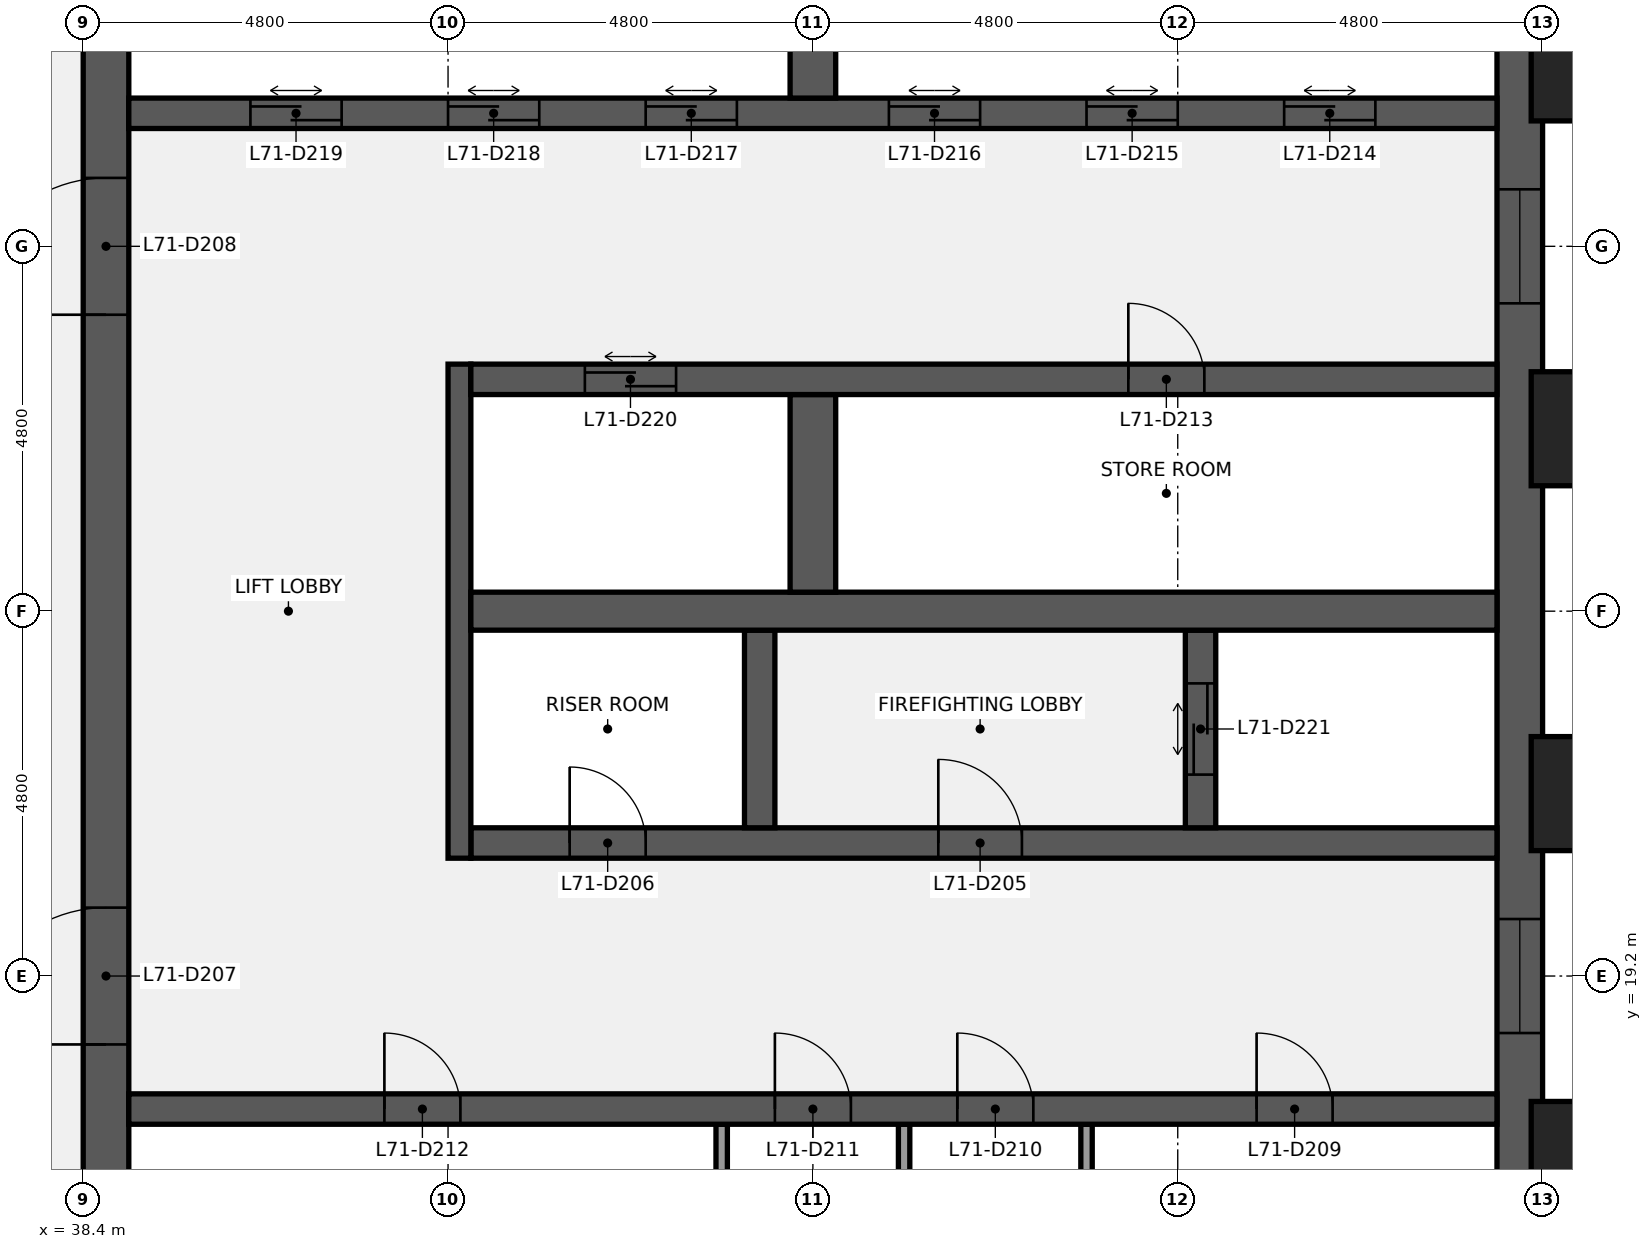
"""IFC4 building model, lengths in metres.
Left out: names, types, materials, properties, quantities, classifications, styles, units other than length and angle.
Written with IfcOpenShell. Run it as: python <this file> out.ifc"""

import sys

from ifc_helpers import new_model, si_unit, direction, frame, frame_2d, origin, origin_2d, place, context, subcontext, project, spatial, rectangle, extrude, element, fill, save


model = new_model("IFC4")
c1 = context("Model", 3, precision=1e-05, world=origin(), true_north=direction((0.0, 1.0)))
c2 = subcontext(c1, "Body", "Model", "MODEL_VIEW")
j1 = project(units=[si_unit("LENGTHUNIT", "METRE"), si_unit("PLANEANGLEUNIT", "RADIAN")], contexts=[c1])
p1 = place(None, origin())
s1 = spatial("IfcSite", under=j1, at=p1, CompositionType="ELEMENT")
p2 = place(p1, origin())
s2 = spatial("IfcBuilding", under=s1, at=p2, CompositionType="ELEMENT")
p3 = place(p2, frame((0.0, 0.0, 322.3)))
s3 = spatial("IfcBuildingStorey", under=s2, at=p3, CompositionType="ELEMENT", Elevation=322.3)
p4 = place(p3, frame((57.3, 38.4, 0.0), z_axis=(0.0, 0.0, 1.0), x_axis=(0.0, -1.0, 0.0)))
e1 = element("IfcWall", 1, at=p4, inside=s3, PredefinedType="SHEAR", context=c2, shape_type="SweptSolid", body=[
    extrude(rectangle(XDim=28.8, YDim=0.6, at=frame_2d((14.4, 0.0))), origin(), (0.0, 0.0, 1.0), 3.84),
])
p5 = place(p4, frame((18.45, 0.0, 0.9)))
e2 = element("IfcOpeningElement", 2, at=p5, cuts=e1, PredefinedType="OPENING", context=c2, shape_type="SweptSolid", body=[
    extrude(rectangle(XDim=1.5, YDim=1.5, at=frame_2d((0.75, 0.75))), frame((0.0, 0.31, 0.0), z_axis=(0.0, -1.0, 0.0), x_axis=(1.0, 0.0, 0.0)), (0.0, 0.0, 1.0), 0.62),
])
p6 = place(p4, frame((8.85, 0.0, 0.9)))
e3 = element("IfcOpeningElement", 3, at=p6, cuts=e1, PredefinedType="OPENING", context=c2, shape_type="SweptSolid", body=[
    extrude(rectangle(XDim=1.5, YDim=1.5, at=frame_2d((0.75, 0.75))), frame((0.0, 0.31, 0.0), z_axis=(0.0, -1.0, 0.0), x_axis=(1.0, 0.0, 0.0)), (0.0, 0.0, 1.0), 0.62),
])
p7 = place(p3, frame((38.7, 9.6, 0.0), z_axis=(0.0, 0.0, 1.0), x_axis=(0.0, 1.0, 0.0)))
e4 = element("IfcWall", 4, at=p7, inside=s3, PredefinedType="SHEAR", context=c2, shape_type="SweptSolid", body=[
    extrude(rectangle(XDim=28.8, YDim=0.6, at=frame_2d((14.4, 0.0))), origin(), (0.0, 0.0, 1.0), 3.84),
])
p8 = place(p7, frame((8.7, 0.0, 0.0)))
e5 = element("IfcOpeningElement", 5, at=p8, cuts=e4, PredefinedType="OPENING", context=c2, shape_type="SweptSolid", body=[
    extrude(rectangle(XDim=1.8, YDim=2.1, at=frame_2d((0.9, 1.05))), frame((0.0, 0.31, 0.0), z_axis=(0.0, -1.0, 0.0), x_axis=(1.0, 0.0, 0.0)), (0.0, 0.0, 1.0), 0.62),
])
p9 = place(p7, frame((18.3, 0.0, 0.0)))
e6 = element("IfcOpeningElement", 6, at=p9, cuts=e4, PredefinedType="OPENING", context=c2, shape_type="SweptSolid", body=[
    extrude(rectangle(XDim=1.8, YDim=2.1, at=frame_2d((0.9, 1.05))), frame((0.0, 0.31, 0.0), z_axis=(0.0, -1.0, 0.0), x_axis=(1.0, 0.0, 0.0)), (0.0, 0.0, 1.0), 0.62),
])
for number, where, z_axis, x_axis in (
    (7, (51.6, 14.65, 0.0), (0.0, 0.0, 1.0), (0.0, 1.0, 0.0)),
    (8, (49.2, 14.65, 0.0), (0.0, 0.0, 1.0), (0.0, 1.0, 0.0)),
    (9, (46.8, 14.65, 0.0), (0.0, 0.0, 1.0), (0.0, 1.0, 0.0)),
):
    element("IfcWall", number, at=place(p3, frame(where, z_axis=z_axis, x_axis=x_axis)), inside=s3, PredefinedType="PARTITIONING", context=c2, shape_type="SweptSolid", body=[
        extrude(rectangle(XDim=2.6, YDim=0.15, at=frame_2d((1.3, 0.0))), origin(), (0.0, 0.0, 1.0), 3.84),
    ])
p10 = place(p3, frame((39.0, 17.45, 0.0), z_axis=(0.0, 0.0, 1.0), x_axis=(1.0, 0.0, 0.0)))
e10 = element("IfcWall", 10, at=p10, inside=s3, PredefinedType="SHEAR", context=c2, shape_type="SweptSolid", body=[
    extrude(rectangle(XDim=18.0, YDim=0.4, at=frame_2d((9.0, 0.0))), origin(), (0.0, 0.0, 1.0), 3.84),
])
p11 = place(p10, frame((14.837, 0.0, 0.0)))
e11 = element("IfcOpeningElement", 11, at=p11, cuts=e10, PredefinedType="OPENING", context=c2, shape_type="SweptSolid", body=[
    extrude(rectangle(XDim=1.0, YDim=2.1, at=frame_2d((0.5, 1.05))), frame((0.0, 0.21, 0.0), z_axis=(0.0, -1.0, 0.0), x_axis=(1.0, 0.0, 0.0)), (0.0, 0.0, 1.0), 0.42),
])
p12 = place(p10, frame((10.9, 0.0, 0.0)))
e12 = element("IfcOpeningElement", 12, at=p12, cuts=e10, PredefinedType="OPENING", context=c2, shape_type="SweptSolid", body=[
    extrude(rectangle(XDim=1.0, YDim=2.1, at=frame_2d((0.5, 1.05))), frame((0.0, 0.21, 0.0), z_axis=(0.0, -1.0, 0.0), x_axis=(1.0, 0.0, 0.0)), (0.0, 0.0, 1.0), 0.42),
])
p13 = place(p10, frame((8.5, 0.0, 0.0)))
e13 = element("IfcOpeningElement", 13, at=p13, cuts=e10, PredefinedType="OPENING", context=c2, shape_type="SweptSolid", body=[
    extrude(rectangle(XDim=1.0, YDim=2.1, at=frame_2d((0.5, 1.05))), frame((0.0, 0.21, 0.0), z_axis=(0.0, -1.0, 0.0), x_axis=(1.0, 0.0, 0.0)), (0.0, 0.0, 1.0), 0.42),
])
p14 = place(p10, frame((3.363, 0.0, 0.0)))
e14 = element("IfcOpeningElement", 14, at=p14, cuts=e10, PredefinedType="OPENING", context=c2, shape_type="SweptSolid", body=[
    extrude(rectangle(XDim=1.0, YDim=2.1, at=frame_2d((0.5, 1.05))), frame((0.0, 0.21, 0.0), z_axis=(0.0, -1.0, 0.0), x_axis=(1.0, 0.0, 0.0)), (0.0, 0.0, 1.0), 0.42),
])
p15 = place(p3, frame((43.5, 20.95, 0.0), z_axis=(0.0, 0.0, 1.0), x_axis=(1.0, 0.0, 0.0)))
e15 = element("IfcWall", 15, at=p15, inside=s3, PredefinedType="SHEAR", context=c2, shape_type="SweptSolid", body=[
    extrude(rectangle(XDim=13.5, YDim=0.4, at=frame_2d((6.75, 0.0))), origin(), (0.0, 0.0, 1.0), 3.84),
])
p16 = place(p15, frame((6.15, 0.0, 0.0)))
e16 = element("IfcOpeningElement", 16, at=p16, cuts=e15, PredefinedType="OPENING", context=c2, shape_type="SweptSolid", body=[
    extrude(rectangle(XDim=1.1, YDim=2.1, at=frame_2d((0.55, 1.05))), frame((0.0, 0.21, 0.0), z_axis=(0.0, -1.0, 0.0), x_axis=(1.0, 0.0, 0.0)), (0.0, 0.0, 1.0), 0.42),
])
p17 = place(p15, frame((1.3, 0.0, 0.0)))
e17 = element("IfcOpeningElement", 17, at=p17, cuts=e15, PredefinedType="OPENING", context=c2, shape_type="SweptSolid", body=[
    extrude(rectangle(XDim=1.0, YDim=2.1, at=frame_2d((0.5, 1.05))), frame((0.0, 0.21, 0.0), z_axis=(0.0, -1.0, 0.0), x_axis=(1.0, 0.0, 0.0)), (0.0, 0.0, 1.0), 0.42),
])
p18 = place(p3, frame((43.35, 20.75, 0.0), z_axis=(0.0, 0.0, 1.0), x_axis=(0.0, 1.0, 0.0)))
e18 = element("IfcWall", 18, at=p18, inside=s3, PredefinedType="SHEAR", context=c2, shape_type="SweptSolid", body=[
    extrude(rectangle(XDim=6.5, YDim=0.3, at=frame_2d((3.25, 0.0))), origin(), (0.0, 0.0, 1.0), 3.84),
])
p19 = place(p3, frame((53.1, 21.15, 0.0), z_axis=(0.0, 0.0, 1.0), x_axis=(0.0, 1.0, 0.0)))
e19 = element("IfcWall", 19, at=p19, inside=s3, PredefinedType="SHEAR", context=c2, shape_type="SweptSolid", body=[
    extrude(rectangle(XDim=2.6, YDim=0.4, at=frame_2d((1.3, 0.0))), origin(), (0.0, 0.0, 1.0), 3.84),
])
p20 = place(p19, frame((0.7, 0.0, 0.0)))
e20 = element("IfcOpeningElement", 20, at=p20, cuts=e19, PredefinedType="OPENING", context=c2, shape_type="SweptSolid", body=[
    extrude(rectangle(XDim=1.2, YDim=2.1, at=frame_2d((0.6, 1.05))), frame((0.0, 0.21, 0.0), z_axis=(0.0, -1.0, 0.0), x_axis=(1.0, 0.0, 0.0)), (0.0, 0.0, 1.0), 0.42),
])
p21 = place(p3, frame((47.3, 21.15, 0.0), z_axis=(0.0, 0.0, 1.0), x_axis=(0.0, 1.0, 0.0)))
e21 = element("IfcWall", 21, at=p21, inside=s3, PredefinedType="SHEAR", context=c2, shape_type="SweptSolid", body=[
    extrude(rectangle(XDim=2.6, YDim=0.4, at=frame_2d((1.3, 0.0))), origin(), (0.0, 0.0, 1.0), 3.84),
])
p22 = place(p3, frame((43.5, 24.0, 0.0), z_axis=(0.0, 0.0, 1.0), x_axis=(1.0, 0.0, 0.0)))
e22 = element("IfcWall", 22, at=p22, inside=s3, PredefinedType="SHEAR", context=c2, shape_type="SweptSolid", body=[
    extrude(rectangle(XDim=13.5, YDim=0.5, at=frame_2d((6.75, 0.0))), origin(), (0.0, 0.0, 1.0), 3.84),
])
p23 = place(p3, frame((48.0, 24.25, 0.0), z_axis=(0.0, 0.0, 1.0), x_axis=(0.0, 1.0, 0.0)))
e23 = element("IfcWall", 23, at=p23, inside=s3, PredefinedType="SHEAR", context=c2, shape_type="SweptSolid", body=[
    extrude(rectangle(XDim=2.6, YDim=0.6, at=frame_2d((1.3, 0.0))), origin(), (0.0, 0.0, 1.0), 3.84),
])
p24 = place(p3, frame((43.5, 27.05, 0.0), z_axis=(0.0, 0.0, 1.0), x_axis=(1.0, 0.0, 0.0)))
e24 = element("IfcWall", 24, at=p24, inside=s3, PredefinedType="SHEAR", context=c2, shape_type="SweptSolid", body=[
    extrude(rectangle(XDim=13.5, YDim=0.4, at=frame_2d((6.75, 0.0))), origin(), (0.0, 0.0, 1.0), 3.84),
])
p25 = place(p24, frame((8.65, 0.0, 0.0)))
e25 = element("IfcOpeningElement", 25, at=p25, cuts=e24, PredefinedType="OPENING", context=c2, shape_type="SweptSolid", body=[
    extrude(rectangle(XDim=1.0, YDim=2.1, at=frame_2d((0.5, 1.05))), frame((0.0, 0.21, 0.0), z_axis=(0.0, -1.0, 0.0), x_axis=(1.0, 0.0, 0.0)), (0.0, 0.0, 1.0), 0.42),
])
p26 = place(p24, frame((1.5, 0.0, 0.0)))
e26 = element("IfcOpeningElement", 26, at=p26, cuts=e24, PredefinedType="OPENING", context=c2, shape_type="SweptSolid", body=[
    extrude(rectangle(XDim=1.2, YDim=2.1, at=frame_2d((0.6, 1.05))), frame((0.0, 0.21, 0.0), z_axis=(0.0, -1.0, 0.0), x_axis=(1.0, 0.0, 0.0)), (0.0, 0.0, 1.0), 0.42),
])
p27 = place(p3, frame((39.0, 30.55, 0.0), z_axis=(0.0, 0.0, 1.0), x_axis=(1.0, 0.0, 0.0)))
e27 = element("IfcWall", 27, at=p27, inside=s3, PredefinedType="SHEAR", context=c2, shape_type="SweptSolid", body=[
    extrude(rectangle(XDim=18.0, YDim=0.4, at=frame_2d((9.0, 0.0))), origin(), (0.0, 0.0, 1.0), 3.84),
])
p28 = place(p27, frame((15.2, 0.0, 0.0)))
e28 = element("IfcOpeningElement", 28, at=p28, cuts=e27, PredefinedType="OPENING", context=c2, shape_type="SweptSolid", body=[
    extrude(rectangle(XDim=1.2, YDim=2.1, at=frame_2d((0.6, 1.05))), frame((0.0, 0.21, 0.0), z_axis=(0.0, -1.0, 0.0), x_axis=(1.0, 0.0, 0.0)), (0.0, 0.0, 1.0), 0.42),
])
p29 = place(p27, frame((12.6, 0.0, 0.0)))
e29 = element("IfcOpeningElement", 29, at=p29, cuts=e27, PredefinedType="OPENING", context=c2, shape_type="SweptSolid", body=[
    extrude(rectangle(XDim=1.2, YDim=2.1, at=frame_2d((0.6, 1.05))), frame((0.0, 0.21, 0.0), z_axis=(0.0, -1.0, 0.0), x_axis=(1.0, 0.0, 0.0)), (0.0, 0.0, 1.0), 0.42),
])
p30 = place(p27, frame((10.0, 0.0, 0.0)))
e30 = element("IfcOpeningElement", 30, at=p30, cuts=e27, PredefinedType="OPENING", context=c2, shape_type="SweptSolid", body=[
    extrude(rectangle(XDim=1.2, YDim=2.1, at=frame_2d((0.6, 1.05))), frame((0.0, 0.21, 0.0), z_axis=(0.0, -1.0, 0.0), x_axis=(1.0, 0.0, 0.0)), (0.0, 0.0, 1.0), 0.42),
])
p31 = place(p27, frame((6.8, 0.0, 0.0)))
e31 = element("IfcOpeningElement", 31, at=p31, cuts=e27, PredefinedType="OPENING", context=c2, shape_type="SweptSolid", body=[
    extrude(rectangle(XDim=1.2, YDim=2.1, at=frame_2d((0.6, 1.05))), frame((0.0, 0.21, 0.0), z_axis=(0.0, -1.0, 0.0), x_axis=(1.0, 0.0, 0.0)), (0.0, 0.0, 1.0), 0.42),
])
p32 = place(p27, frame((4.2, 0.0, 0.0)))
e32 = element("IfcOpeningElement", 32, at=p32, cuts=e27, PredefinedType="OPENING", context=c2, shape_type="SweptSolid", body=[
    extrude(rectangle(XDim=1.2, YDim=2.1, at=frame_2d((0.6, 1.05))), frame((0.0, 0.21, 0.0), z_axis=(0.0, -1.0, 0.0), x_axis=(1.0, 0.0, 0.0)), (0.0, 0.0, 1.0), 0.42),
])
p33 = place(p27, frame((1.6, 0.0, 0.0)))
e33 = element("IfcOpeningElement", 33, at=p33, cuts=e27, PredefinedType="OPENING", context=c2, shape_type="SweptSolid", body=[
    extrude(rectangle(XDim=1.2, YDim=2.1, at=frame_2d((0.6, 1.05))), frame((0.0, 0.21, 0.0), z_axis=(0.0, -1.0, 0.0), x_axis=(1.0, 0.0, 0.0)), (0.0, 0.0, 1.0), 0.42),
])
p34 = place(p3, frame((48.0, 30.75, 0.0), z_axis=(0.0, 0.0, 1.0), x_axis=(0.0, 1.0, 0.0)))
e34 = element("IfcWall", 34, at=p34, inside=s3, PredefinedType="SHEAR", context=c2, shape_type="SweptSolid", body=[
    extrude(rectangle(XDim=2.6, YDim=0.6, at=frame_2d((1.3, 0.0))), origin(), (0.0, 0.0, 1.0), 3.84),
])
for number, where, z_axis, x_axis in (
    (35, (58.35, 16.8, 0.0), (0.0, 0.0, 1.0), (0.0, 1.0, 0.0)),
    (36, (58.35, 21.6, 0.0), (0.0, 0.0, 1.0), (0.0, 1.0, 0.0)),
    (37, (58.35, 26.4, 0.0), (0.0, 0.0, 1.0), (0.0, 1.0, 0.0)),
    (38, (58.35, 31.2, 0.0), (0.0, 0.0, 1.0), (0.0, 1.0, 0.0)),
):
    element("IfcColumn", number, at=place(p3, frame(where, z_axis=z_axis, x_axis=x_axis)), inside=s3, PredefinedType="PILASTER", context=c2, shape_type="SweptSolid", body=[
        extrude(rectangle(XDim=1.8, YDim=1.5, at=origin_2d()), origin(), (0.0, 0.0, 1.0), 4.0),
    ])
p35 = place(p16, origin())
e39 = element("IfcDoor", 39, at=p35, inside=s3, OperationType="SINGLE_SWING_LEFT", PredefinedType="DOOR", context=c2, shape_type="SweptSolid", body=[
    extrude(rectangle(XDim=1.1, YDim=2.1, at=frame_2d((0.55, 1.05))), frame((0.0, 0.025, 0.0), z_axis=(0.0, -1.0, 0.0), x_axis=(1.0, 0.0, 0.0)), (0.0, 0.0, 1.0), 0.05),
])
fill(e16, e39)
p36 = place(p17, origin())
e40 = element("IfcDoor", 40, at=p36, inside=s3, OperationType="SINGLE_SWING_LEFT", PredefinedType="DOOR", context=c2, shape_type="SweptSolid", body=[
    extrude(rectangle(XDim=1.0, YDim=2.1, at=frame_2d((0.5, 1.05))), frame((0.0, 0.025, 0.0), z_axis=(0.0, -1.0, 0.0), x_axis=(1.0, 0.0, 0.0)), (0.0, 0.0, 1.0), 0.05),
])
fill(e17, e40)
p37 = place(p8, origin())
e41 = element("IfcDoor", 41, at=p37, inside=s3, OperationType="DOUBLE_DOOR_SINGLE_SWING", PredefinedType="DOOR", context=c2, shape_type="SweptSolid", body=[
    extrude(rectangle(XDim=1.8, YDim=2.1, at=frame_2d((0.9, 1.05))), frame((0.0, 0.025, 0.0), z_axis=(0.0, -1.0, 0.0), x_axis=(1.0, 0.0, 0.0)), (0.0, 0.0, 1.0), 0.05),
])
fill(e5, e41)
p38 = place(p9, origin())
e42 = element("IfcDoor", 42, at=p38, inside=s3, OperationType="DOUBLE_DOOR_SINGLE_SWING", PredefinedType="DOOR", context=c2, shape_type="SweptSolid", body=[
    extrude(rectangle(XDim=1.8, YDim=2.1, at=frame_2d((0.9, 1.05))), frame((0.0, 0.025, 0.0), z_axis=(0.0, -1.0, 0.0), x_axis=(1.0, 0.0, 0.0)), (0.0, 0.0, 1.0), 0.05),
])
fill(e6, e42)
p39 = place(p11, origin())
e43 = element("IfcDoor", 43, at=p39, inside=s3, OperationType="SINGLE_SWING_LEFT", PredefinedType="DOOR", context=c2, shape_type="SweptSolid", body=[
    extrude(rectangle(XDim=1.0, YDim=2.1, at=frame_2d((0.5, 1.05))), frame((0.0, 0.025, 0.0), z_axis=(0.0, -1.0, 0.0), x_axis=(1.0, 0.0, 0.0)), (0.0, 0.0, 1.0), 0.05),
])
fill(e11, e43)
p40 = place(p12, origin())
e44 = element("IfcDoor", 44, at=p40, inside=s3, OperationType="SINGLE_SWING_LEFT", PredefinedType="DOOR", context=c2, shape_type="SweptSolid", body=[
    extrude(rectangle(XDim=1.0, YDim=2.1, at=frame_2d((0.5, 1.05))), frame((0.0, 0.025, 0.0), z_axis=(0.0, -1.0, 0.0), x_axis=(1.0, 0.0, 0.0)), (0.0, 0.0, 1.0), 0.05),
])
fill(e12, e44)
p41 = place(p13, origin())
e45 = element("IfcDoor", 45, at=p41, inside=s3, OperationType="SINGLE_SWING_LEFT", PredefinedType="DOOR", context=c2, shape_type="SweptSolid", body=[
    extrude(rectangle(XDim=1.0, YDim=2.1, at=frame_2d((0.5, 1.05))), frame((0.0, 0.025, 0.0), z_axis=(0.0, -1.0, 0.0), x_axis=(1.0, 0.0, 0.0)), (0.0, 0.0, 1.0), 0.05),
])
fill(e13, e45)
p42 = place(p14, origin())
e46 = element("IfcDoor", 46, at=p42, inside=s3, OperationType="SINGLE_SWING_LEFT", PredefinedType="DOOR", context=c2, shape_type="SweptSolid", body=[
    extrude(rectangle(XDim=1.0, YDim=2.1, at=frame_2d((0.5, 1.05))), frame((0.0, 0.025, 0.0), z_axis=(0.0, -1.0, 0.0), x_axis=(1.0, 0.0, 0.0)), (0.0, 0.0, 1.0), 0.05),
])
fill(e14, e46)
p43 = place(p25, origin())
e47 = element("IfcDoor", 47, at=p43, inside=s3, OperationType="SINGLE_SWING_LEFT", PredefinedType="DOOR", context=c2, shape_type="SweptSolid", body=[
    extrude(rectangle(XDim=1.0, YDim=2.1, at=frame_2d((0.5, 1.05))), frame((0.0, 0.025, 0.0), z_axis=(0.0, -1.0, 0.0), x_axis=(1.0, 0.0, 0.0)), (0.0, 0.0, 1.0), 0.05),
])
fill(e25, e47)
p44 = place(p28, origin())
e48 = element("IfcDoor", 48, at=p44, inside=s3, OperationType="DOUBLE_DOOR_SLIDING", PredefinedType="DOOR", context=c2, shape_type="SweptSolid", body=[
    extrude(rectangle(XDim=1.2, YDim=2.1, at=frame_2d((0.6, 1.05))), frame((0.0, 0.025, 0.0), z_axis=(0.0, -1.0, 0.0), x_axis=(1.0, 0.0, 0.0)), (0.0, 0.0, 1.0), 0.05),
])
fill(e28, e48)
p45 = place(p29, origin())
e49 = element("IfcDoor", 49, at=p45, inside=s3, OperationType="DOUBLE_DOOR_SLIDING", PredefinedType="DOOR", context=c2, shape_type="SweptSolid", body=[
    extrude(rectangle(XDim=1.2, YDim=2.1, at=frame_2d((0.6, 1.05))), frame((0.0, 0.025, 0.0), z_axis=(0.0, -1.0, 0.0), x_axis=(1.0, 0.0, 0.0)), (0.0, 0.0, 1.0), 0.05),
])
fill(e29, e49)
p46 = place(p30, origin())
e50 = element("IfcDoor", 50, at=p46, inside=s3, OperationType="DOUBLE_DOOR_SLIDING", PredefinedType="DOOR", context=c2, shape_type="SweptSolid", body=[
    extrude(rectangle(XDim=1.2, YDim=2.1, at=frame_2d((0.6, 1.05))), frame((0.0, 0.025, 0.0), z_axis=(0.0, -1.0, 0.0), x_axis=(1.0, 0.0, 0.0)), (0.0, 0.0, 1.0), 0.05),
])
fill(e30, e50)
p47 = place(p31, origin())
e51 = element("IfcDoor", 51, at=p47, inside=s3, OperationType="DOUBLE_DOOR_SLIDING", PredefinedType="DOOR", context=c2, shape_type="SweptSolid", body=[
    extrude(rectangle(XDim=1.2, YDim=2.1, at=frame_2d((0.6, 1.05))), frame((0.0, 0.025, 0.0), z_axis=(0.0, -1.0, 0.0), x_axis=(1.0, 0.0, 0.0)), (0.0, 0.0, 1.0), 0.05),
])
fill(e31, e51)
p48 = place(p32, origin())
e52 = element("IfcDoor", 52, at=p48, inside=s3, OperationType="DOUBLE_DOOR_SLIDING", PredefinedType="DOOR", context=c2, shape_type="SweptSolid", body=[
    extrude(rectangle(XDim=1.2, YDim=2.1, at=frame_2d((0.6, 1.05))), frame((0.0, 0.025, 0.0), z_axis=(0.0, -1.0, 0.0), x_axis=(1.0, 0.0, 0.0)), (0.0, 0.0, 1.0), 0.05),
])
fill(e32, e52)
p49 = place(p33, origin())
e53 = element("IfcDoor", 53, at=p49, inside=s3, OperationType="DOUBLE_DOOR_SLIDING", PredefinedType="DOOR", context=c2, shape_type="SweptSolid", body=[
    extrude(rectangle(XDim=1.2, YDim=2.1, at=frame_2d((0.6, 1.05))), frame((0.0, 0.025, 0.0), z_axis=(0.0, -1.0, 0.0), x_axis=(1.0, 0.0, 0.0)), (0.0, 0.0, 1.0), 0.05),
])
fill(e33, e53)
p50 = place(p26, origin())
e54 = element("IfcDoor", 54, at=p50, inside=s3, OperationType="DOUBLE_DOOR_SLIDING", PredefinedType="DOOR", context=c2, shape_type="SweptSolid", body=[
    extrude(rectangle(XDim=1.2, YDim=2.1, at=frame_2d((0.6, 1.05))), frame((0.0, 0.025, 0.0), z_axis=(0.0, -1.0, 0.0), x_axis=(1.0, 0.0, 0.0)), (0.0, 0.0, 1.0), 0.05),
])
fill(e26, e54)
p51 = place(p20, origin())
e55 = element("IfcDoor", 55, at=p51, inside=s3, OperationType="DOUBLE_DOOR_SLIDING", PredefinedType="DOOR", context=c2, shape_type="SweptSolid", body=[
    extrude(rectangle(XDim=1.2, YDim=2.1, at=frame_2d((0.6, 1.05))), frame((0.0, 0.025, 0.0), z_axis=(0.0, -1.0, 0.0), x_axis=(1.0, 0.0, 0.0)), (0.0, 0.0, 1.0), 0.05),
])
fill(e20, e55)
p52 = place(p5, origin())
e56 = element("IfcWindow", 56, at=p52, inside=s3, PartitioningType="SINGLE_PANEL", PredefinedType="WINDOW", context=c2, shape_type="SweptSolid", body=[
    extrude(rectangle(XDim=1.5, YDim=1.5, at=frame_2d((0.75, 0.75))), frame((0.0, 0.03, 0.0), z_axis=(0.0, -1.0, 0.0), x_axis=(1.0, 0.0, 0.0)), (0.0, 0.0, 1.0), 0.06),
])
fill(e2, e56)
p53 = place(p6, origin())
e57 = element("IfcWindow", 57, at=p53, inside=s3, PartitioningType="SINGLE_PANEL", PredefinedType="WINDOW", context=c2, shape_type="SweptSolid", body=[
    extrude(rectangle(XDim=1.5, YDim=1.5, at=frame_2d((0.75, 0.75))), frame((0.0, 0.03, 0.0), z_axis=(0.0, -1.0, 0.0), x_axis=(1.0, 0.0, 0.0)), (0.0, 0.0, 1.0), 0.06),
])
fill(e3, e57)
save(model, sys.argv[1])
